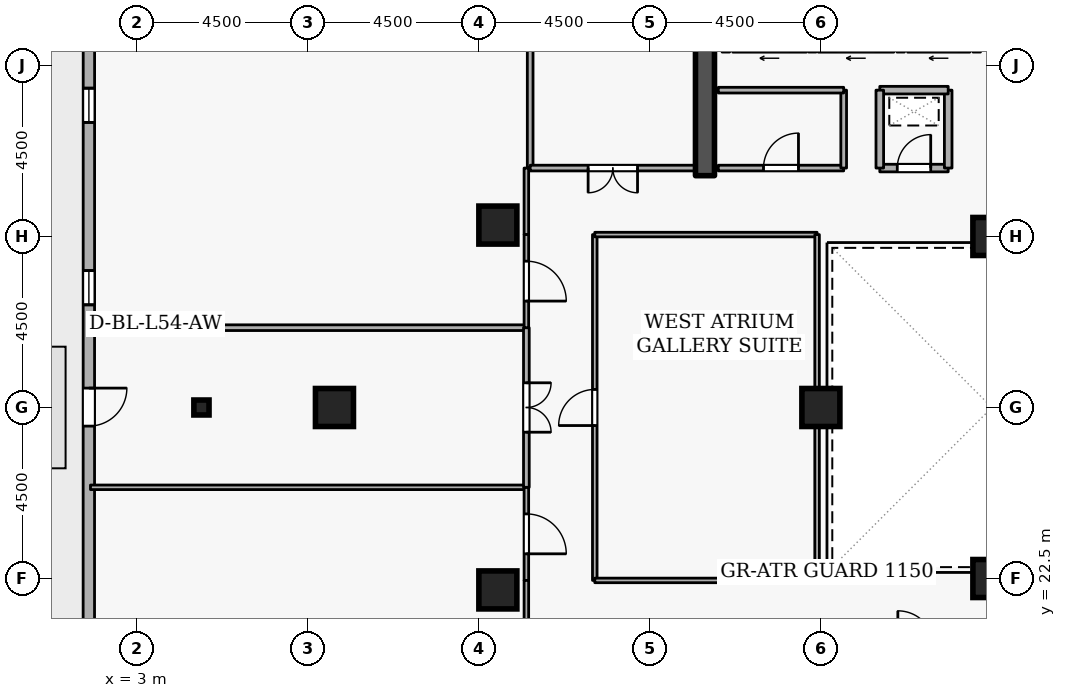
"""IFC4 building model, lengths in metres.
Left out: names, types, materials, properties, quantities, classifications, styles, units other than length and angle.
Written with IfcOpenShell. Run it as: python <this file> out.ifc"""

import sys

from ifc_helpers import new_model, si_unit, direction, frame, frame_2d, origin, origin_2d, place, context, subcontext, project, spatial, rectangle, i_section, extrude, element, fill, save


model = new_model("IFC4")
c1 = context("Model", 3, precision=1e-05, world=origin(), true_north=direction((0.0, 1.0)))
c2 = subcontext(c1, "Body", "Model", "MODEL_VIEW")
j1 = project(units=[si_unit("LENGTHUNIT", "METRE"), si_unit("PLANEANGLEUNIT", "RADIAN")], contexts=[c1])
p1 = place(None, origin())
s1 = spatial("IfcSite", under=j1, at=p1, CompositionType="ELEMENT")
p2 = place(p1, origin())
s2 = spatial("IfcBuilding", under=s1, at=p2, CompositionType="ELEMENT")
p3 = place(p2, frame((0.0, 0.0, 203.7)))
s3 = spatial("IfcBuildingStorey", under=s2, at=p3, CompositionType="ELEMENT", Elevation=203.7)
p4 = place(p3, frame((17.95, 33.1, 0.0), z_axis=(0.0, 0.0, 1.0), x_axis=(0.0, 1.0, 0.0)))
e1 = element("IfcWall", 1, at=p4, inside=s3, PredefinedType="SHEAR", context=c2, shape_type="SweptSolid", body=[
    extrude(rectangle(XDim=5.8, YDim=0.5, at=frame_2d((2.9, 0.0))), origin(), (0.0, 0.0, 1.0), 3.6),
])
for number, where, z_axis, x_axis in (
    (2, (8.2, 27.0, 0.0), (0.0, 0.0, 1.0), (1.0, 0.0, 0.0)),
    (3, (12.5, 22.2, 0.0), (0.0, 0.0, 1.0), (1.0, 0.0, 0.0)),
    (4, (12.5, 31.8, 0.0), (0.0, 0.0, 1.0), (1.0, 0.0, 0.0)),
    (5, (25.5, 22.5, 0.0), (0.0, 0.0, 1.0), (1.0, 0.0, 0.0)),
    (6, (25.5, 31.5, 0.0), (0.0, 0.0, 1.0), (1.0, 0.0, 0.0)),
    (7, (21.0, 27.0, 0.0), (0.0, 0.0, 1.0), (1.0, 0.0, 0.0)),
):
    element("IfcColumn", number, at=place(p3, frame(where, z_axis=z_axis, x_axis=x_axis)), inside=s3, PredefinedType="COLUMN", context=c2, shape_type="SweptSolid", body=[
        extrude(rectangle(XDim=1.0, YDim=1.0, at=origin_2d()), origin(), (0.0, 0.0, 1.0), 3.6),
    ])
p5 = place(p3, frame((4.7, 27.0, 0.0), z_axis=(0.0, 0.0, 1.0), x_axis=(1.0, 0.0, 0.0)))
e8 = element("IfcColumn", 8, at=p5, inside=s3, PredefinedType="COLUMN", context=c2, shape_type="SweptSolid", body=[
    extrude(i_section(OverallWidth=0.399, OverallDepth=0.394, WebThickness=0.023, FlangeThickness=0.037, FilletRadius=0.015, at=origin_2d()), origin(), (0.0, 0.0, 1.0), 3.6),
])
p6 = place(p3, frame((1.74, 46.802, 0.0), z_axis=(0.0, 0.0, 1.0), x_axis=(-0.000132597301, -0.999999991209, 0.0)))
e9 = element("IfcWall", 9, at=p6, inside=s3, PredefinedType="STANDARD", context=c2, shape_type="SweptSolid", body=[
    extrude(rectangle(XDim=34.983, YDim=0.3, at=frame_2d((17.492, 0.0))), origin(), (0.0, 0.0, 1.0), 2.7),
])
p7 = place(p6, frame((19.292, 0.0, 0.0)))
e10 = element("IfcOpeningElement", 10, at=p7, cuts=e9, PredefinedType="OPENING", context=c2, shape_type="SweptSolid", body=[
    extrude(rectangle(XDim=1.0, YDim=2.08, at=frame_2d((0.5, 1.04))), frame((0.0, 0.16, 0.0), z_axis=(0.0, -1.0, 0.0), x_axis=(1.0, 0.0, 0.0)), (0.0, 0.0, 1.0), 0.32),
])
p8 = place(p6, frame((1.8, 0.0, 0.72)))
e11 = element("IfcOpeningElement", 11, at=p8, cuts=e9, PredefinedType="OPENING", context=c2, shape_type="SweptSolid", body=[
    extrude(rectangle(XDim=0.9, YDim=1.75, at=frame_2d((0.45, 0.875))), frame((0.0, 0.16, 0.0), z_axis=(0.0, -1.0, 0.0), x_axis=(1.0, 0.0, 0.0)), (0.0, 0.0, 1.0), 0.32),
])
p9 = place(p6, frame((6.6, 0.0, 0.72)))
e12 = element("IfcOpeningElement", 12, at=p9, cuts=e9, PredefinedType="OPENING", context=c2, shape_type="SweptSolid", body=[
    extrude(rectangle(XDim=0.9, YDim=1.75, at=frame_2d((0.45, 0.875))), frame((0.0, 0.16, 0.0), z_axis=(0.0, -1.0, 0.0), x_axis=(1.0, 0.0, 0.0)), (0.0, 0.0, 1.0), 0.32),
])
p10 = place(p6, frame((11.4, 0.0, 0.72)))
e13 = element("IfcOpeningElement", 13, at=p10, cuts=e9, PredefinedType="OPENING", context=c2, shape_type="SweptSolid", body=[
    extrude(rectangle(XDim=0.9, YDim=1.75, at=frame_2d((0.45, 0.875))), frame((0.0, 0.16, 0.0), z_axis=(0.0, -1.0, 0.0), x_axis=(1.0, 0.0, 0.0)), (0.0, 0.0, 1.0), 0.32),
])
p11 = place(p6, frame((16.2, 0.0, 0.72)))
e14 = element("IfcOpeningElement", 14, at=p11, cuts=e9, PredefinedType="OPENING", context=c2, shape_type="SweptSolid", body=[
    extrude(rectangle(XDim=0.9, YDim=1.75, at=frame_2d((0.45, 0.875))), frame((0.0, 0.16, 0.0), z_axis=(0.0, -1.0, 0.0), x_axis=(1.0, 0.0, 0.0)), (0.0, 0.0, 1.0), 0.32),
])
p12 = place(p6, frame((25.8, 0.0, 0.72)))
e15 = element("IfcOpeningElement", 15, at=p12, cuts=e9, PredefinedType="OPENING", context=c2, shape_type="SweptSolid", body=[
    extrude(rectangle(XDim=0.9, YDim=1.75, at=frame_2d((0.45, 0.875))), frame((0.0, 0.16, 0.0), z_axis=(0.0, -1.0, 0.0), x_axis=(1.0, 0.0, 0.0)), (0.0, 0.0, 1.0), 0.32),
])
p13 = place(p6, frame((30.6, 0.0, 0.72)))
e16 = element("IfcOpeningElement", 16, at=p13, cuts=e9, PredefinedType="OPENING", context=c2, shape_type="SweptSolid", body=[
    extrude(rectangle(XDim=0.9, YDim=1.75, at=frame_2d((0.45, 0.875))), frame((0.0, 0.16, 0.0), z_axis=(0.0, -1.0, 0.0), x_axis=(1.0, 0.0, 0.0)), (0.0, 0.0, 1.0), 0.32),
])
p14 = place(p3, frame((24.92, 36.45, 0.0), z_axis=(0.0, 0.0, 1.0), x_axis=(-1.0, 0.0, 0.0)))
e17 = element("IfcWall", 17, at=p14, inside=s3, PredefinedType="STANDARD", context=c2, shape_type="SweptSolid", body=[
    extrude(rectangle(XDim=1.64, YDim=0.2, at=frame_2d((0.82, 0.0))), origin(), (0.0, 0.0, 1.0), 3.34),
])
p15 = place(p14, frame((0.31, 0.0, 0.0)))
e18 = element("IfcOpeningElement", 18, at=p15, cuts=e17, PredefinedType="OPENING", context=c2, shape_type="SweptSolid", body=[
    extrude(rectangle(XDim=1.02, YDim=2.06, at=frame_2d((0.51, 1.03))), frame((0.0, 0.11, 0.0), z_axis=(0.0, -1.0, 0.0), x_axis=(1.0, 0.0, 0.0)), (0.0, 0.0, 1.0), 0.22),
])
p16 = place(p3, frame((22.92, 36.45, 0.0), z_axis=(0.0, 0.0, 1.0), x_axis=(-1.0, 0.0, 0.0)))
e19 = element("IfcWall", 19, at=p16, inside=s3, PredefinedType="STANDARD", context=c2, shape_type="SweptSolid", body=[
    extrude(rectangle(XDim=1.99, YDim=0.2, at=frame_2d((0.995, 0.0))), origin(), (0.0, 0.0, 1.0), 3.34),
])
p17 = place(p16, frame((0.485, 0.0, 0.0)))
e20 = element("IfcOpeningElement", 20, at=p17, cuts=e19, PredefinedType="OPENING", context=c2, shape_type="SweptSolid", body=[
    extrude(rectangle(XDim=1.02, YDim=2.06, at=frame_2d((0.51, 1.03))), frame((0.0, 0.11, 0.0), z_axis=(0.0, -1.0, 0.0), x_axis=(1.0, 0.0, 0.0)), (0.0, 0.0, 1.0), 0.22),
])
p18 = place(p3, frame((20.62, 36.45, 0.0), z_axis=(0.0, 0.0, 1.0), x_axis=(-1.0, 0.0, 0.0)))
e21 = element("IfcWall", 21, at=p18, inside=s3, PredefinedType="STANDARD", context=c2, shape_type="SweptSolid", body=[
    extrude(rectangle(XDim=1.94, YDim=0.2, at=frame_2d((0.97, 0.0))), origin(), (0.0, 0.0, 1.0), 3.34),
])
p19 = place(p18, frame((0.46, 0.0, 0.0)))
e22 = element("IfcOpeningElement", 22, at=p19, cuts=e21, PredefinedType="OPENING", context=c2, shape_type="SweptSolid", body=[
    extrude(rectangle(XDim=1.02, YDim=2.06, at=frame_2d((0.51, 1.03))), frame((0.0, 0.11, 0.0), z_axis=(0.0, -1.0, 0.0), x_axis=(1.0, 0.0, 0.0)), (0.0, 0.0, 1.0), 0.22),
])
p20 = place(p3, frame((22.55, 33.3, 0.0), z_axis=(0.0, 0.0, 1.0), x_axis=(1.0, 0.0, 0.0)))
e23 = element("IfcWall", 23, at=p20, inside=s3, PredefinedType="STANDARD", context=c2, shape_type="SweptSolid", body=[
    extrude(rectangle(XDim=1.8, YDim=0.2, at=frame_2d((0.9, 0.0))), origin(), (0.0, 0.0, 1.0), 3.34),
])
p21 = place(p20, frame((0.46, 0.0, 0.0)))
e24 = element("IfcOpeningElement", 24, at=p21, cuts=e23, PredefinedType="OPENING", context=c2, shape_type="SweptSolid", body=[
    extrude(rectangle(XDim=0.88, YDim=2.04, at=frame_2d((0.44, 1.02))), frame((0.0, 0.11, 0.0), z_axis=(0.0, -1.0, 0.0), x_axis=(1.0, 0.0, 0.0)), (0.0, 0.0, 1.0), 0.22),
])
p22 = place(p3, frame((24.35, 33.3, 0.0), z_axis=(0.0, 0.0, 1.0), x_axis=(0.0, 1.0, 0.0)))
e25 = element("IfcWall", 25, at=p22, inside=s3, PredefinedType="STANDARD", context=c2, shape_type="SweptSolid", body=[
    extrude(rectangle(XDim=2.05, YDim=0.2, at=frame_2d((1.025, 0.0))), origin(), (0.0, 0.0, 1.0), 3.34),
])
p23 = place(p3, frame((24.35, 35.35, 0.0), z_axis=(0.0, 0.0, 1.0), x_axis=(-1.0, 0.0, 0.0)))
e26 = element("IfcWall", 26, at=p23, inside=s3, PredefinedType="STANDARD", context=c2, shape_type="SweptSolid", body=[
    extrude(rectangle(XDim=1.8, YDim=0.2, at=frame_2d((0.9, 0.0))), origin(), (0.0, 0.0, 1.0), 3.34),
])
p24 = place(p3, frame((22.55, 35.35, 0.0), z_axis=(0.0, 0.0, 1.0), x_axis=(0.0, -1.0, 0.0)))
e27 = element("IfcWall", 27, at=p24, inside=s3, PredefinedType="STANDARD", context=c2, shape_type="SweptSolid", body=[
    extrude(rectangle(XDim=2.05, YDim=0.2, at=frame_2d((1.025, 0.0))), origin(), (0.0, 0.0, 1.0), 3.34),
])
p25 = place(p3, frame((18.3, 33.3, 0.0), z_axis=(0.0, 0.0, 1.0), x_axis=(1.0, 0.0, 0.0)))
e28 = element("IfcWall", 28, at=p25, inside=s3, PredefinedType="PARTITIONING", context=c2, shape_type="SweptSolid", body=[
    extrude(rectangle(XDim=3.3, YDim=0.15, at=frame_2d((1.65, 0.0))), origin(), (0.0, 0.0, 1.0), 3.34),
])
p26 = place(p25, frame((1.19, 0.0, 0.0)))
e29 = element("IfcOpeningElement", 29, at=p26, cuts=e28, PredefinedType="OPENING", context=c2, shape_type="SweptSolid", body=[
    extrude(rectangle(XDim=0.92, YDim=2.08, at=frame_2d((0.46, 1.04))), frame((0.0, 0.085, 0.0), z_axis=(0.0, -1.0, 0.0), x_axis=(1.0, 0.0, 0.0)), (0.0, 0.0, 1.0), 0.17),
])
p27 = place(p3, frame((21.6, 33.3, 0.0), z_axis=(0.0, 0.0, 1.0), x_axis=(0.0, 1.0, 0.0)))
e30 = element("IfcWall", 30, at=p27, inside=s3, PredefinedType="PARTITIONING", context=c2, shape_type="SweptSolid", body=[
    extrude(rectangle(XDim=2.05, YDim=0.15, at=frame_2d((1.025, 0.0))), origin(), (0.0, 0.0, 1.0), 3.34),
])
p28 = place(p3, frame((21.6, 35.35, 0.0), z_axis=(0.0, 0.0, 1.0), x_axis=(-1.0, 0.0, 0.0)))
e31 = element("IfcWall", 31, at=p28, inside=s3, PredefinedType="PARTITIONING", context=c2, shape_type="SweptSolid", body=[
    extrude(rectangle(XDim=3.3, YDim=0.15, at=frame_2d((1.65, 0.0))), origin(), (0.0, 0.0, 1.0), 3.34),
])
p29 = place(p3, frame((13.35, 33.3, 0.0), z_axis=(0.0, 0.0, 1.0), x_axis=(0.0, 1.0, 0.0)))
e32 = element("IfcWall", 32, at=p29, inside=s3, PredefinedType="PARTITIONING", context=c2, shape_type="SweptSolid", body=[
    extrude(rectangle(XDim=17.42, YDim=0.15, at=frame_2d((8.71, 0.0))), origin(), (0.0, 0.0, 1.0), 3.34),
])
p30 = place(p3, frame((17.7, 33.3, 0.0), z_axis=(0.0, 0.0, 1.0), x_axis=(-1.0, 0.0, 0.0)))
e33 = element("IfcWall", 33, at=p30, inside=s3, PredefinedType="PARTITIONING", context=c2, shape_type="SweptSolid", body=[
    extrude(rectangle(XDim=4.35, YDim=0.15, at=frame_2d((2.175, 0.0))), origin(), (0.0, 0.0, 1.0), 3.34),
])
p31 = place(p30, frame((1.525, 0.0, 0.0)))
e34 = element("IfcOpeningElement", 34, at=p31, cuts=e33, PredefinedType="OPENING", context=c2, shape_type="SweptSolid", body=[
    extrude(rectangle(XDim=1.3, YDim=2.12, at=frame_2d((0.65, 1.06))), frame((0.0, 0.085, 0.0), z_axis=(0.0, -1.0, 0.0), x_axis=(1.0, 0.0, 0.0)), (0.0, 0.0, 1.0), 0.17),
])
p32 = place(p3, frame((1.78, 24.9, 0.0), z_axis=(0.0, 0.0, 1.0), x_axis=(1.0, 0.0, 0.0)))
e35 = element("IfcWall", 35, at=p32, inside=s3, PredefinedType="PARTITIONING", context=c2, shape_type="SweptSolid", body=[
    extrude(rectangle(XDim=11.47, YDim=0.12, at=frame_2d((5.735, 0.0))), origin(), (0.0, 0.0, 1.0), 3.34),
])
p33 = place(p3, frame((13.25, 24.9, 0.0), z_axis=(0.0, 0.0, 1.0), x_axis=(0.0, -1.0, 0.0)))
e36 = element("IfcWall", 36, at=p33, inside=s3, PredefinedType="PARTITIONING", context=c2, shape_type="SweptSolid", body=[
    extrude(rectangle(XDim=2.45, YDim=0.12, at=frame_2d((1.225, 0.0))), origin(), (0.0, 0.0, 1.0), 3.34),
])
p34 = place(p33, frame((0.7, 0.0, 0.0)))
e37 = element("IfcOpeningElement", 37, at=p34, cuts=e36, PredefinedType="OPENING", context=c2, shape_type="SweptSolid", body=[
    extrude(rectangle(XDim=1.05, YDim=2.1, at=frame_2d((0.525, 1.05))), frame((0.0, 0.07, 0.0), z_axis=(0.0, -1.0, 0.0), x_axis=(1.0, 0.0, 0.0)), (0.0, 0.0, 1.0), 0.14),
])
p35 = place(p3, frame((13.25, 22.45, 0.0), z_axis=(0.0, 0.0, 1.0), x_axis=(0.0, -1.0, 0.0)))
e38 = element("IfcWall", 38, at=p35, inside=s3, PredefinedType="PARTITIONING", context=c2, shape_type="SweptSolid", body=[
    extrude(rectangle(XDim=1.75, YDim=0.12, at=frame_2d((0.875, 0.0))), origin(), (0.0, 0.0, 1.0), 3.34),
])
p36 = place(p3, frame((1.78, 29.1, 0.0), z_axis=(0.0, 0.0, 1.0), x_axis=(1.0, 0.0, 0.0)))
e39 = element("IfcWall", 39, at=p36, inside=s3, PredefinedType="PARTITIONING", context=c2, shape_type="SweptSolid", body=[
    extrude(rectangle(XDim=11.47, YDim=0.15, at=frame_2d((5.735, 0.0))), origin(), (0.0, 0.0, 1.0), 3.34),
])
p37 = place(p3, frame((13.25, 29.1, 0.0), z_axis=(0.0, 0.0, 1.0), x_axis=(0.0, -1.0, 0.0)))
e40 = element("IfcWall", 40, at=p37, inside=s3, PredefinedType="PARTITIONING", context=c2, shape_type="SweptSolid", body=[
    extrude(rectangle(XDim=4.2, YDim=0.15, at=frame_2d((2.1, 0.0))), origin(), (0.0, 0.0, 1.0), 3.34),
])
p38 = place(p37, frame((1.45, 0.0, 0.0)))
e41 = element("IfcOpeningElement", 41, at=p38, cuts=e40, PredefinedType="OPENING", context=c2, shape_type="SweptSolid", body=[
    extrude(rectangle(XDim=1.3, YDim=2.12, at=frame_2d((0.65, 1.06))), frame((0.0, 0.085, 0.0), z_axis=(0.0, -1.0, 0.0), x_axis=(1.0, 0.0, 0.0)), (0.0, 0.0, 1.0), 0.17),
])
p39 = place(p3, frame((13.25, 33.3, 0.0), z_axis=(0.0, 0.0, 1.0), x_axis=(0.0, -1.0, 0.0)))
e42 = element("IfcWall", 42, at=p39, inside=s3, PredefinedType="PARTITIONING", context=c2, shape_type="SweptSolid", body=[
    extrude(rectangle(XDim=1.75, YDim=0.12, at=frame_2d((0.875, 0.0))), origin(), (0.0, 0.0, 1.0), 3.34),
])
p40 = place(p3, frame((13.25, 31.55, 0.0), z_axis=(0.0, 0.0, 1.0), x_axis=(0.0, -1.0, 0.0)))
e43 = element("IfcWall", 43, at=p40, inside=s3, PredefinedType="PARTITIONING", context=c2, shape_type="SweptSolid", body=[
    extrude(rectangle(XDim=2.45, YDim=0.12, at=frame_2d((1.225, 0.0))), origin(), (0.0, 0.0, 1.0), 3.34),
])
p41 = place(p40, frame((0.7, 0.0, 0.0)))
e44 = element("IfcOpeningElement", 44, at=p41, cuts=e43, PredefinedType="OPENING", context=c2, shape_type="SweptSolid", body=[
    extrude(rectangle(XDim=1.05, YDim=2.1, at=frame_2d((0.525, 1.05))), frame((0.0, 0.07, 0.0), z_axis=(0.0, -1.0, 0.0), x_axis=(1.0, 0.0, 0.0)), (0.0, 0.0, 1.0), 0.14),
])
p42 = place(p3, frame((15.05, 22.45, 0.0), z_axis=(0.0, 0.0, 1.0), x_axis=(0.0, 1.0, 0.0)))
e45 = element("IfcWall", 45, at=p42, inside=s3, PredefinedType="PARTITIONING", context=c2, shape_type="SweptSolid", body=[
    extrude(rectangle(XDim=9.1, YDim=0.12, at=frame_2d((4.55, 0.0))), origin(), (0.0, 0.0, 1.0), 3.34),
])
p43 = place(p42, frame((4.075, 0.0, 0.0)))
e46 = element("IfcOpeningElement", 46, at=p43, cuts=e45, PredefinedType="OPENING", context=c2, shape_type="SweptSolid", body=[
    extrude(rectangle(XDim=0.95, YDim=2.1, at=frame_2d((0.475, 1.05))), frame((0.0, 0.07, 0.0), z_axis=(0.0, -1.0, 0.0), x_axis=(1.0, 0.0, 0.0)), (0.0, 0.0, 1.0), 0.14),
])
p44 = place(p3, frame((15.05, 31.55, 0.0), z_axis=(0.0, 0.0, 1.0), x_axis=(1.0, 0.0, 0.0)))
e47 = element("IfcWall", 47, at=p44, inside=s3, PredefinedType="PARTITIONING", context=c2, shape_type="SweptSolid", body=[
    extrude(rectangle(XDim=5.85, YDim=0.12, at=frame_2d((2.925, 0.0))), origin(), (0.0, 0.0, 1.0), 3.34),
])
p45 = place(p3, frame((20.9, 31.55, 0.0), z_axis=(0.0, 0.0, 1.0), x_axis=(0.0, -1.0, 0.0)))
e48 = element("IfcWall", 48, at=p45, inside=s3, PredefinedType="PARTITIONING", context=c2, shape_type="SweptSolid", body=[
    extrude(rectangle(XDim=9.1, YDim=0.12, at=frame_2d((4.55, 0.0))), origin(), (0.0, 0.0, 1.0), 3.34),
])
p46 = place(p3, frame((20.9, 22.45, 0.0), z_axis=(0.0, 0.0, 1.0), x_axis=(-1.0, 0.0, 0.0)))
e49 = element("IfcWall", 49, at=p46, inside=s3, PredefinedType="PARTITIONING", context=c2, shape_type="SweptSolid", body=[
    extrude(rectangle(XDim=5.85, YDim=0.12, at=frame_2d((2.925, 0.0))), origin(), (0.0, 0.0, 1.0), 3.34),
])
p47 = place(p7, origin())
e50 = element("IfcDoor", 50, at=p47, inside=s3, OperationType="SINGLE_SWING_LEFT", PredefinedType="DOOR", context=c2, shape_type="SweptSolid", body=[
    extrude(rectangle(XDim=1.0, YDim=2.08, at=frame_2d((0.5, 1.04))), frame((0.0, 0.025, 0.0), z_axis=(0.0, -1.0, 0.0), x_axis=(1.0, 0.0, 0.0)), (0.0, 0.0, 1.0), 0.05),
])
fill(e10, e50)
p48 = place(p10, origin())
e51 = element("IfcWindow", 51, at=p48, inside=s3, PartitioningType="SINGLE_PANEL", PredefinedType="WINDOW", context=c2, shape_type="SweptSolid", body=[
    extrude(rectangle(XDim=0.9, YDim=1.75, at=frame_2d((0.45, 0.875))), frame((0.0, 0.03, 0.0), z_axis=(0.0, -1.0, 0.0), x_axis=(1.0, 0.0, 0.0)), (0.0, 0.0, 1.0), 0.06),
])
fill(e13, e51)
p49 = place(p11, origin())
e52 = element("IfcWindow", 52, at=p49, inside=s3, PartitioningType="SINGLE_PANEL", PredefinedType="WINDOW", context=c2, shape_type="SweptSolid", body=[
    extrude(rectangle(XDim=0.9, YDim=1.75, at=frame_2d((0.45, 0.875))), frame((0.0, 0.03, 0.0), z_axis=(0.0, -1.0, 0.0), x_axis=(1.0, 0.0, 0.0)), (0.0, 0.0, 1.0), 0.06),
])
fill(e14, e52)
p50 = place(p21, origin())
e53 = element("IfcDoor", 53, at=p50, inside=s3, OperationType="SINGLE_SWING_RIGHT", PredefinedType="DOOR", context=c2, shape_type="SweptSolid", body=[
    extrude(rectangle(XDim=0.88, YDim=2.04, at=frame_2d((0.44, 1.02))), frame((0.0, 0.025, 0.0), z_axis=(0.0, -1.0, 0.0), x_axis=(1.0, 0.0, 0.0)), (0.0, 0.0, 1.0), 0.05),
])
fill(e24, e53)
p51 = place(p26, origin())
e54 = element("IfcDoor", 54, at=p51, inside=s3, OperationType="SINGLE_SWING_RIGHT", PredefinedType="DOOR", context=c2, shape_type="SweptSolid", body=[
    extrude(rectangle(XDim=0.92, YDim=2.08, at=frame_2d((0.46, 1.04))), frame((0.0, 0.025, 0.0), z_axis=(0.0, -1.0, 0.0), x_axis=(1.0, 0.0, 0.0)), (0.0, 0.0, 1.0), 0.05),
])
fill(e29, e54)
p52 = place(p31, origin())
e55 = element("IfcDoor", 55, at=p52, inside=s3, OperationType="DOUBLE_DOOR_SINGLE_SWING", PredefinedType="DOOR", context=c2, shape_type="SweptSolid", body=[
    extrude(rectangle(XDim=1.3, YDim=2.12, at=frame_2d((0.65, 1.06))), frame((0.0, 0.025, 0.0), z_axis=(0.0, -1.0, 0.0), x_axis=(1.0, 0.0, 0.0)), (0.0, 0.0, 1.0), 0.05),
])
fill(e34, e55)
p53 = place(p34, origin())
e56 = element("IfcDoor", 56, at=p53, inside=s3, OperationType="SINGLE_SWING_RIGHT", PredefinedType="DOOR", context=c2, shape_type="SweptSolid", body=[
    extrude(rectangle(XDim=1.05, YDim=2.1, at=frame_2d((0.525, 1.05))), frame((0.0, 0.025, 0.0), z_axis=(0.0, -1.0, 0.0), x_axis=(1.0, 0.0, 0.0)), (0.0, 0.0, 1.0), 0.05),
])
fill(e37, e56)
p54 = place(p38, origin())
e57 = element("IfcDoor", 57, at=p54, inside=s3, OperationType="DOUBLE_DOOR_SINGLE_SWING", PredefinedType="DOOR", context=c2, shape_type="SweptSolid", body=[
    extrude(rectangle(XDim=1.3, YDim=2.12, at=frame_2d((0.65, 1.06))), frame((0.0, 0.025, 0.0), z_axis=(0.0, -1.0, 0.0), x_axis=(1.0, 0.0, 0.0)), (0.0, 0.0, 1.0), 0.05),
])
fill(e41, e57)
p55 = place(p41, origin())
e58 = element("IfcDoor", 58, at=p55, inside=s3, OperationType="SINGLE_SWING_RIGHT", PredefinedType="DOOR", context=c2, shape_type="SweptSolid", body=[
    extrude(rectangle(XDim=1.05, YDim=2.1, at=frame_2d((0.525, 1.05))), frame((0.0, 0.025, 0.0), z_axis=(0.0, -1.0, 0.0), x_axis=(1.0, 0.0, 0.0)), (0.0, 0.0, 1.0), 0.05),
])
fill(e44, e58)
p56 = place(p43, origin())
e59 = element("IfcDoor", 59, at=p56, inside=s3, OperationType="SINGLE_SWING_LEFT", PredefinedType="DOOR", context=c2, shape_type="SweptSolid", body=[
    extrude(rectangle(XDim=0.95, YDim=2.1, at=frame_2d((0.475, 1.05))), frame((0.0, 0.025, 0.0), z_axis=(0.0, -1.0, 0.0), x_axis=(1.0, 0.0, 0.0)), (0.0, 0.0, 1.0), 0.05),
])
fill(e46, e59)
save(model, sys.argv[1])
